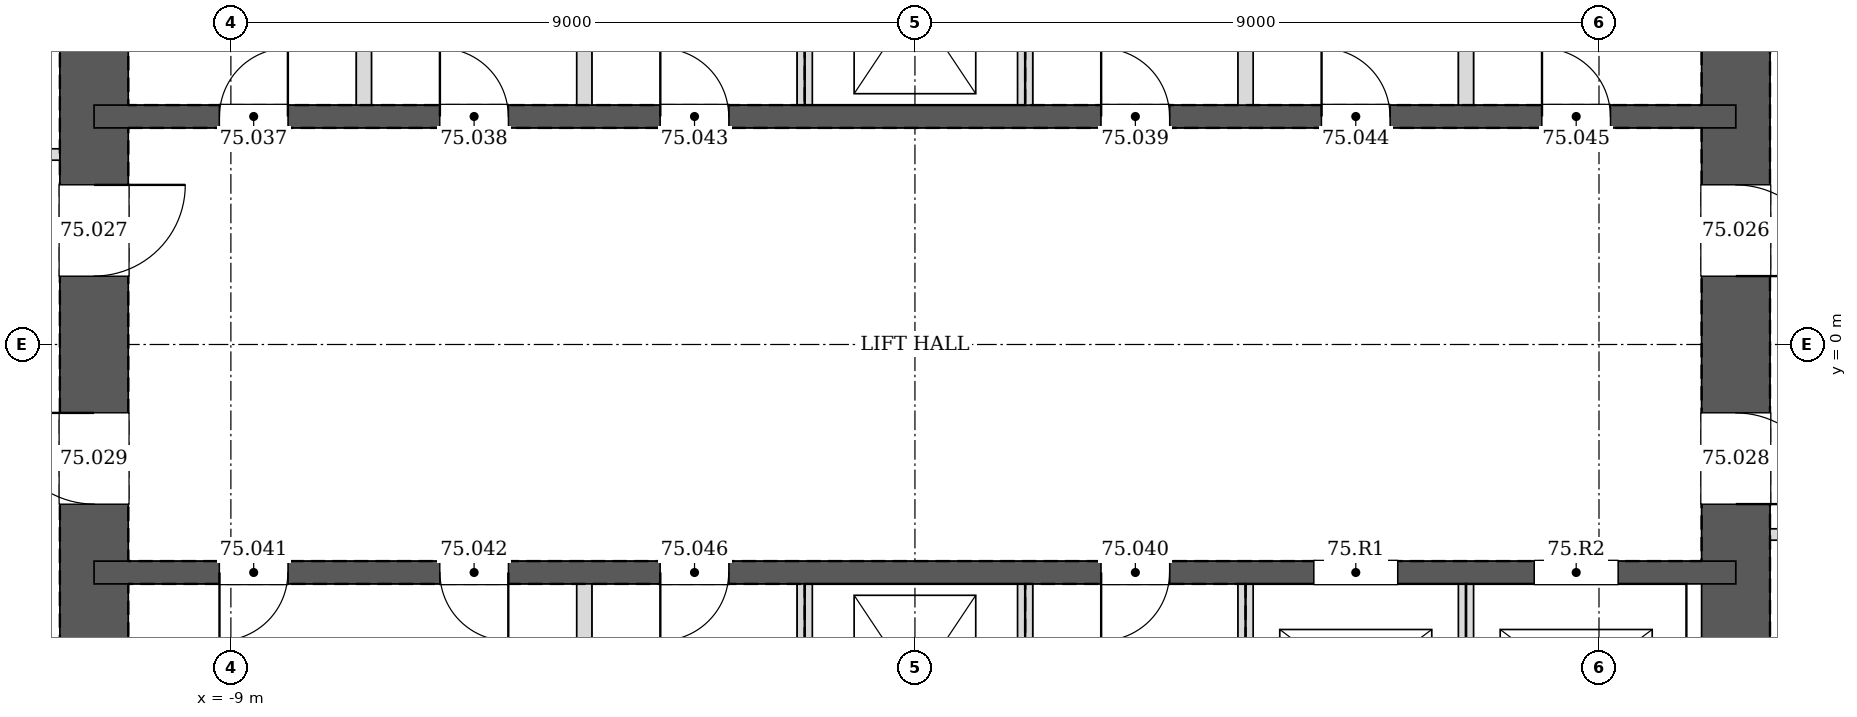
"""IFC4 building model, lengths in metres.
Left out: names, types, materials, properties, quantities, classifications, styles, units other than length and angle.
Written with IfcOpenShell. Run it as: python <this file> out.ifc"""

import sys

from ifc_helpers import new_model, si_unit, direction, frame, frame_2d, origin, place, context, subcontext, project, spatial, rectangle, extrude, element, fill, save


model = new_model("IFC4")
c1 = context("Model", 3, precision=1e-05, world=origin(), true_north=direction((0.0, 1.0)))
c2 = subcontext(c1, "Body", "Model", "MODEL_VIEW")
j1 = project(units=[si_unit("LENGTHUNIT", "METRE"), si_unit("PLANEANGLEUNIT", "RADIAN")], contexts=[c1])
p1 = place(None, origin())
s1 = spatial("IfcSite", under=j1, at=p1, CompositionType="ELEMENT")
p2 = place(p1, origin())
s2 = spatial("IfcBuilding", under=s1, at=p2, CompositionType="ELEMENT")
p3 = place(p2, frame((0.0, 0.0, 304.8)))
s3 = spatial("IfcBuildingStorey", under=s2, at=p3, CompositionType="ELEMENT", Elevation=304.8)
p4 = place(p3, frame((10.8, -10.8, 0.0), z_axis=(0.0, 0.0, 1.0), x_axis=(0.0, 1.0, 0.0)))
e1 = element("IfcWall", 1, at=p4, inside=s3, PredefinedType="SOLIDWALL", context=c2, shape_type="SweptSolid", body=[
    extrude(rectangle(XDim=21.6, YDim=0.9, at=frame_2d((10.8, 0.0))), origin(), (0.0, 0.0, 1.0), 3.4),
])
p5 = place(p4, frame((11.7, 0.0, 0.0)))
e2 = element("IfcOpeningElement", 2, at=p5, cuts=e1, PredefinedType="OPENING", context=c2, shape_type="SweptSolid", body=[
    extrude(rectangle(XDim=1.2, YDim=2.1, at=frame_2d((0.6, 1.05))), frame((0.0, 0.46, 0.0), z_axis=(0.0, -1.0, 0.0), x_axis=(1.0, 0.0, 0.0)), (0.0, 0.0, 1.0), 0.92),
])
p6 = place(p4, frame((8.7, 0.0, 0.0)))
e3 = element("IfcOpeningElement", 3, at=p6, cuts=e1, PredefinedType="OPENING", context=c2, shape_type="SweptSolid", body=[
    extrude(rectangle(XDim=1.2, YDim=2.1, at=frame_2d((0.6, 1.05))), frame((0.0, 0.46, 0.0), z_axis=(0.0, -1.0, 0.0), x_axis=(1.0, 0.0, 0.0)), (0.0, 0.0, 1.0), 0.92),
])
p7 = place(p3, frame((-10.8, 10.8, 0.0), z_axis=(0.0, 0.0, 1.0), x_axis=(0.0, -1.0, 0.0)))
e4 = element("IfcWall", 4, at=p7, inside=s3, PredefinedType="SOLIDWALL", context=c2, shape_type="SweptSolid", body=[
    extrude(rectangle(XDim=21.6, YDim=0.9, at=frame_2d((10.8, 0.0))), origin(), (0.0, 0.0, 1.0), 3.4),
])
p8 = place(p7, frame((8.7, 0.0, 0.0)))
e5 = element("IfcOpeningElement", 5, at=p8, cuts=e4, PredefinedType="OPENING", context=c2, shape_type="SweptSolid", body=[
    extrude(rectangle(XDim=1.2, YDim=2.1, at=frame_2d((0.6, 1.05))), frame((0.0, 0.46, 0.0), z_axis=(0.0, -1.0, 0.0), x_axis=(1.0, 0.0, 0.0)), (0.0, 0.0, 1.0), 0.92),
])
p9 = place(p7, frame((11.7, 0.0, 0.0)))
e6 = element("IfcOpeningElement", 6, at=p9, cuts=e4, PredefinedType="OPENING", context=c2, shape_type="SweptSolid", body=[
    extrude(rectangle(XDim=1.2, YDim=2.1, at=frame_2d((0.6, 1.05))), frame((0.0, 0.46, 0.0), z_axis=(0.0, -1.0, 0.0), x_axis=(1.0, 0.0, 0.0)), (0.0, 0.0, 1.0), 0.92),
])
p10 = place(p3, frame((-10.8, 3.0, 0.0), z_axis=(0.0, 0.0, 1.0), x_axis=(1.0, 0.0, 0.0)))
e7 = element("IfcWall", 7, at=p10, inside=s3, PredefinedType="SOLIDWALL", context=c2, shape_type="SweptSolid", body=[
    extrude(rectangle(XDim=21.6, YDim=0.3, at=frame_2d((10.8, 0.0))), origin(), (0.0, 0.0, 1.0), 3.4),
])
p11 = place(p10, frame((1.65, 0.0, 0.0)))
e8 = element("IfcOpeningElement", 8, at=p11, cuts=e7, PredefinedType="OPENING", context=c2, shape_type="SweptSolid", body=[
    extrude(rectangle(XDim=0.9, YDim=2.1, at=frame_2d((0.45, 1.05))), frame((0.0, 0.16, 0.0), z_axis=(0.0, -1.0, 0.0), x_axis=(1.0, 0.0, 0.0)), (0.0, 0.0, 1.0), 0.32),
])
p12 = place(p10, frame((4.55, 0.0, 0.0)))
e9 = element("IfcOpeningElement", 9, at=p12, cuts=e7, PredefinedType="OPENING", context=c2, shape_type="SweptSolid", body=[
    extrude(rectangle(XDim=0.9, YDim=2.1, at=frame_2d((0.45, 1.05))), frame((0.0, 0.16, 0.0), z_axis=(0.0, -1.0, 0.0), x_axis=(1.0, 0.0, 0.0)), (0.0, 0.0, 1.0), 0.32),
])
p13 = place(p10, frame((13.25, 0.0, 0.0)))
e10 = element("IfcOpeningElement", 10, at=p13, cuts=e7, PredefinedType="OPENING", context=c2, shape_type="SweptSolid", body=[
    extrude(rectangle(XDim=0.9, YDim=2.1, at=frame_2d((0.45, 1.05))), frame((0.0, 0.16, 0.0), z_axis=(0.0, -1.0, 0.0), x_axis=(1.0, 0.0, 0.0)), (0.0, 0.0, 1.0), 0.32),
])
p14 = place(p10, frame((7.45, 0.0, 0.0)))
e11 = element("IfcOpeningElement", 11, at=p14, cuts=e7, PredefinedType="OPENING", context=c2, shape_type="SweptSolid", body=[
    extrude(rectangle(XDim=0.9, YDim=2.1, at=frame_2d((0.45, 1.05))), frame((0.0, 0.16, 0.0), z_axis=(0.0, -1.0, 0.0), x_axis=(1.0, 0.0, 0.0)), (0.0, 0.0, 1.0), 0.32),
])
p15 = place(p10, frame((16.15, 0.0, 0.0)))
e12 = element("IfcOpeningElement", 12, at=p15, cuts=e7, PredefinedType="OPENING", context=c2, shape_type="SweptSolid", body=[
    extrude(rectangle(XDim=0.9, YDim=2.1, at=frame_2d((0.45, 1.05))), frame((0.0, 0.16, 0.0), z_axis=(0.0, -1.0, 0.0), x_axis=(1.0, 0.0, 0.0)), (0.0, 0.0, 1.0), 0.32),
])
p16 = place(p10, frame((19.05, 0.0, 0.0)))
e13 = element("IfcOpeningElement", 13, at=p16, cuts=e7, PredefinedType="OPENING", context=c2, shape_type="SweptSolid", body=[
    extrude(rectangle(XDim=0.9, YDim=2.1, at=frame_2d((0.45, 1.05))), frame((0.0, 0.16, 0.0), z_axis=(0.0, -1.0, 0.0), x_axis=(1.0, 0.0, 0.0)), (0.0, 0.0, 1.0), 0.32),
])
p17 = place(p3, frame((-10.8, -3.0, 0.0), z_axis=(0.0, 0.0, 1.0), x_axis=(1.0, 0.0, 0.0)))
e14 = element("IfcWall", 14, at=p17, inside=s3, PredefinedType="SOLIDWALL", context=c2, shape_type="SweptSolid", body=[
    extrude(rectangle(XDim=21.6, YDim=0.3, at=frame_2d((10.8, 0.0))), origin(), (0.0, 0.0, 1.0), 3.4),
])
p18 = place(p17, frame((13.25, 0.0, 0.0)))
e15 = element("IfcOpeningElement", 15, at=p18, cuts=e14, PredefinedType="OPENING", context=c2, shape_type="SweptSolid", body=[
    extrude(rectangle(XDim=0.9, YDim=2.1, at=frame_2d((0.45, 1.05))), frame((0.0, 0.16, 0.0), z_axis=(0.0, -1.0, 0.0), x_axis=(1.0, 0.0, 0.0)), (0.0, 0.0, 1.0), 0.32),
])
p19 = place(p17, frame((1.65, 0.0, 0.0)))
e16 = element("IfcOpeningElement", 16, at=p19, cuts=e14, PredefinedType="OPENING", context=c2, shape_type="SweptSolid", body=[
    extrude(rectangle(XDim=0.9, YDim=2.1, at=frame_2d((0.45, 1.05))), frame((0.0, 0.16, 0.0), z_axis=(0.0, -1.0, 0.0), x_axis=(1.0, 0.0, 0.0)), (0.0, 0.0, 1.0), 0.32),
])
p20 = place(p17, frame((4.55, 0.0, 0.0)))
e17 = element("IfcOpeningElement", 17, at=p20, cuts=e14, PredefinedType="OPENING", context=c2, shape_type="SweptSolid", body=[
    extrude(rectangle(XDim=0.9, YDim=2.1, at=frame_2d((0.45, 1.05))), frame((0.0, 0.16, 0.0), z_axis=(0.0, -1.0, 0.0), x_axis=(1.0, 0.0, 0.0)), (0.0, 0.0, 1.0), 0.32),
])
p21 = place(p17, frame((7.45, 0.0, 0.0)))
e18 = element("IfcOpeningElement", 18, at=p21, cuts=e14, PredefinedType="OPENING", context=c2, shape_type="SweptSolid", body=[
    extrude(rectangle(XDim=0.9, YDim=2.1, at=frame_2d((0.45, 1.05))), frame((0.0, 0.16, 0.0), z_axis=(0.0, -1.0, 0.0), x_axis=(1.0, 0.0, 0.0)), (0.0, 0.0, 1.0), 0.32),
])
p22 = place(p17, frame((16.05, 0.0, 0.0)))
e19 = element("IfcOpeningElement", 19, at=p22, cuts=e14, PredefinedType="OPENING", context=c2, shape_type="SweptSolid", body=[
    extrude(rectangle(XDim=1.1, YDim=2.1, at=frame_2d((0.55, 1.05))), frame((0.0, 0.16, 0.0), z_axis=(0.0, -1.0, 0.0), x_axis=(1.0, 0.0, 0.0)), (0.0, 0.0, 1.0), 0.32),
])
p23 = place(p17, frame((18.95, 0.0, 0.0)))
e20 = element("IfcOpeningElement", 20, at=p23, cuts=e14, PredefinedType="OPENING", context=c2, shape_type="SweptSolid", body=[
    extrude(rectangle(XDim=1.1, YDim=2.1, at=frame_2d((0.55, 1.05))), frame((0.0, 0.16, 0.0), z_axis=(0.0, -1.0, 0.0), x_axis=(1.0, 0.0, 0.0)), (0.0, 0.0, 1.0), 0.32),
])
p24 = place(p3, frame((11.25, -2.5, 0.0), z_axis=(0.0, 0.0, 1.0), x_axis=(1.0, 0.0, 0.0)))
e21 = element("IfcWall", 21, at=p24, inside=s3, PredefinedType="PARTITIONING", context=c2, shape_type="SweptSolid", body=[
    extrude(rectangle(XDim=1.65, YDim=0.15, at=frame_2d((0.825, 0.0))), origin(), (0.0, 0.0, 1.0), 3.2),
])
p25 = place(p3, frame((-11.25, 2.5, 0.0), z_axis=(0.0, 0.0, 1.0), x_axis=(-1.0, 0.0, 0.0)))
e22 = element("IfcWall", 22, at=p25, inside=s3, PredefinedType="PARTITIONING", context=c2, shape_type="SweptSolid", body=[
    extrude(rectangle(XDim=1.65, YDim=0.15, at=frame_2d((0.825, 0.0))), origin(), (0.0, 0.0, 1.0), 3.2),
])
p26 = place(p25, frame((0.35, 0.0, 0.0)))
e23 = element("IfcOpeningElement", 23, at=p26, cuts=e22, PredefinedType="OPENING", context=c2, shape_type="SweptSolid", body=[
    extrude(rectangle(XDim=0.95, YDim=2.1, at=frame_2d((0.475, 1.05))), frame((0.0, 0.085, 0.0), z_axis=(0.0, -1.0, 0.0), x_axis=(1.0, 0.0, 0.0)), (0.0, 0.0, 1.0), 0.17),
])
for number, where, z_axis, x_axis in (
    (24, (-7.25, 3.15, 0.0), (0.0, 0.0, 1.0), (0.0, 1.0, 0.0)),
    (25, (-4.35, 3.15, 0.0), (0.0, 0.0, 1.0), (0.0, 1.0, 0.0)),
    (26, (-1.45, 3.15, 0.0), (0.0, 0.0, 1.0), (0.0, 1.0, 0.0)),
    (27, (1.45, 3.15, 0.0), (0.0, 0.0, 1.0), (0.0, 1.0, 0.0)),
    (28, (4.35, 3.15, 0.0), (0.0, 0.0, 1.0), (0.0, 1.0, 0.0)),
    (29, (7.25, 3.15, 0.0), (0.0, 0.0, 1.0), (0.0, 1.0, 0.0)),
    (30, (-4.35, -5.85, 0.0), (0.0, 0.0, 1.0), (0.0, 1.0, 0.0)),
    (31, (-1.45, -5.85, 0.0), (0.0, 0.0, 1.0), (0.0, 1.0, 0.0)),
    (32, (1.45, -5.85, 0.0), (0.0, 0.0, 1.0), (0.0, 1.0, 0.0)),
    (33, (4.35, -5.85, 0.0), (0.0, 0.0, 1.0), (0.0, 1.0, 0.0)),
):
    element("IfcWall", number, at=place(p3, frame(where, z_axis=z_axis, x_axis=x_axis)), inside=s3, PredefinedType="PARTITIONING", context=c2, shape_type="SweptSolid", body=[
        extrude(rectangle(XDim=2.7, YDim=0.2, at=frame_2d((1.35, 0.0))), origin(), (0.0, 0.0, 1.0), 3.2),
    ])
p27 = place(p3, frame((7.25, -5.85, 0.0), z_axis=(0.0, 0.0, 1.0), x_axis=(0.0, 1.0, 0.0)))
e34 = element("IfcWall", 34, at=p27, inside=s3, PredefinedType="PARTITIONING", context=c2, shape_type="SweptSolid", body=[
    extrude(rectangle(XDim=2.7, YDim=0.2, at=frame_2d((1.35, 0.0))), origin(), (0.0, 0.0, 1.0), 3.4),
])
p28 = place(p5, frame((1.2, 0.0, 0.0), z_axis=(0.0, 0.0, 1.0), x_axis=(-1.0, 0.0, 0.0)))
e35 = element("IfcDoor", 35, at=p28, inside=s3, OperationType="SINGLE_SWING_RIGHT", PredefinedType="DOOR", context=c2, shape_type="SweptSolid", body=[
    extrude(rectangle(XDim=1.2, YDim=2.1, at=frame_2d((0.6, 1.05))), frame((0.0, 0.025, 0.0), z_axis=(0.0, -1.0, 0.0), x_axis=(1.0, 0.0, 0.0)), (0.0, 0.0, 1.0), 0.05),
])
fill(e2, e35)
p29 = place(p8, origin())
e36 = element("IfcDoor", 36, at=p29, inside=s3, OperationType="SINGLE_SWING_LEFT", PredefinedType="DOOR", context=c2, shape_type="SweptSolid", body=[
    extrude(rectangle(XDim=1.2, YDim=2.1, at=frame_2d((0.6, 1.05))), frame((0.0, 0.025, 0.0), z_axis=(0.0, -1.0, 0.0), x_axis=(1.0, 0.0, 0.0)), (0.0, 0.0, 1.0), 0.05),
])
fill(e5, e36)
p30 = place(p6, frame((1.2, 0.0, 0.0), z_axis=(0.0, 0.0, 1.0), x_axis=(-1.0, 0.0, 0.0)))
e37 = element("IfcDoor", 37, at=p30, inside=s3, OperationType="SINGLE_SWING_RIGHT", PredefinedType="DOOR", context=c2, shape_type="SweptSolid", body=[
    extrude(rectangle(XDim=1.2, YDim=2.1, at=frame_2d((0.6, 1.05))), frame((0.0, 0.025, 0.0), z_axis=(0.0, -1.0, 0.0), x_axis=(1.0, 0.0, 0.0)), (0.0, 0.0, 1.0), 0.05),
])
fill(e3, e37)
p31 = place(p9, frame((1.2, 0.0, 0.0), z_axis=(0.0, 0.0, 1.0), x_axis=(-1.0, 0.0, 0.0)))
e38 = element("IfcDoor", 38, at=p31, inside=s3, OperationType="SINGLE_SWING_RIGHT", PredefinedType="DOOR", context=c2, shape_type="SweptSolid", body=[
    extrude(rectangle(XDim=1.2, YDim=2.1, at=frame_2d((0.6, 1.05))), frame((0.0, 0.025, 0.0), z_axis=(0.0, -1.0, 0.0), x_axis=(1.0, 0.0, 0.0)), (0.0, 0.0, 1.0), 0.05),
])
fill(e6, e38)
p32 = place(p11, origin())
e39 = element("IfcDoor", 39, at=p32, inside=s3, OperationType="SINGLE_SWING_RIGHT", PredefinedType="DOOR", context=c2, shape_type="SweptSolid", body=[
    extrude(rectangle(XDim=0.9, YDim=2.1, at=frame_2d((0.45, 1.05))), frame((0.0, 0.025, 0.0), z_axis=(0.0, -1.0, 0.0), x_axis=(1.0, 0.0, 0.0)), (0.0, 0.0, 1.0), 0.05),
])
fill(e8, e39)
p33 = place(p12, origin())
e40 = element("IfcDoor", 40, at=p33, inside=s3, OperationType="SINGLE_SWING_LEFT", PredefinedType="DOOR", context=c2, shape_type="SweptSolid", body=[
    extrude(rectangle(XDim=0.9, YDim=2.1, at=frame_2d((0.45, 1.05))), frame((0.0, 0.025, 0.0), z_axis=(0.0, -1.0, 0.0), x_axis=(1.0, 0.0, 0.0)), (0.0, 0.0, 1.0), 0.05),
])
fill(e9, e40)
p34 = place(p13, origin())
e41 = element("IfcDoor", 41, at=p34, inside=s3, OperationType="SINGLE_SWING_LEFT", PredefinedType="DOOR", context=c2, shape_type="SweptSolid", body=[
    extrude(rectangle(XDim=0.9, YDim=2.1, at=frame_2d((0.45, 1.05))), frame((0.0, 0.025, 0.0), z_axis=(0.0, -1.0, 0.0), x_axis=(1.0, 0.0, 0.0)), (0.0, 0.0, 1.0), 0.05),
])
fill(e10, e41)
p35 = place(p18, frame((0.9, 0.0, 0.0), z_axis=(0.0, 0.0, 1.0), x_axis=(-1.0, 0.0, 0.0)))
e42 = element("IfcDoor", 42, at=p35, inside=s3, OperationType="SINGLE_SWING_RIGHT", PredefinedType="DOOR", context=c2, shape_type="SweptSolid", body=[
    extrude(rectangle(XDim=0.9, YDim=2.1, at=frame_2d((0.45, 1.05))), frame((0.0, 0.025, 0.0), z_axis=(0.0, -1.0, 0.0), x_axis=(1.0, 0.0, 0.0)), (0.0, 0.0, 1.0), 0.05),
])
fill(e15, e42)
p36 = place(p19, frame((0.9, 0.0, 0.0), z_axis=(0.0, 0.0, 1.0), x_axis=(-1.0, 0.0, 0.0)))
e43 = element("IfcDoor", 43, at=p36, inside=s3, OperationType="SINGLE_SWING_RIGHT", PredefinedType="DOOR", context=c2, shape_type="SweptSolid", body=[
    extrude(rectangle(XDim=0.9, YDim=2.1, at=frame_2d((0.45, 1.05))), frame((0.0, 0.025, 0.0), z_axis=(0.0, -1.0, 0.0), x_axis=(1.0, 0.0, 0.0)), (0.0, 0.0, 1.0), 0.05),
])
fill(e16, e43)
p37 = place(p20, frame((0.9, 0.0, 0.0), z_axis=(0.0, 0.0, 1.0), x_axis=(-1.0, 0.0, 0.0)))
e44 = element("IfcDoor", 44, at=p37, inside=s3, OperationType="SINGLE_SWING_LEFT", PredefinedType="DOOR", context=c2, shape_type="SweptSolid", body=[
    extrude(rectangle(XDim=0.9, YDim=2.1, at=frame_2d((0.45, 1.05))), frame((0.0, 0.025, 0.0), z_axis=(0.0, -1.0, 0.0), x_axis=(1.0, 0.0, 0.0)), (0.0, 0.0, 1.0), 0.05),
])
fill(e17, e44)
p38 = place(p14, origin())
e45 = element("IfcDoor", 45, at=p38, inside=s3, OperationType="SINGLE_SWING_LEFT", PredefinedType="DOOR", context=c2, shape_type="SweptSolid", body=[
    extrude(rectangle(XDim=0.9, YDim=2.1, at=frame_2d((0.45, 1.05))), frame((0.0, 0.025, 0.0), z_axis=(0.0, -1.0, 0.0), x_axis=(1.0, 0.0, 0.0)), (0.0, 0.0, 1.0), 0.05),
])
fill(e11, e45)
p39 = place(p15, origin())
e46 = element("IfcDoor", 46, at=p39, inside=s3, OperationType="SINGLE_SWING_LEFT", PredefinedType="DOOR", context=c2, shape_type="SweptSolid", body=[
    extrude(rectangle(XDim=0.9, YDim=2.1, at=frame_2d((0.45, 1.05))), frame((0.0, 0.025, 0.0), z_axis=(0.0, -1.0, 0.0), x_axis=(1.0, 0.0, 0.0)), (0.0, 0.0, 1.0), 0.05),
])
fill(e12, e46)
p40 = place(p16, origin())
e47 = element("IfcDoor", 47, at=p40, inside=s3, OperationType="SINGLE_SWING_LEFT", PredefinedType="DOOR", context=c2, shape_type="SweptSolid", body=[
    extrude(rectangle(XDim=0.9, YDim=2.1, at=frame_2d((0.45, 1.05))), frame((0.0, 0.025, 0.0), z_axis=(0.0, -1.0, 0.0), x_axis=(1.0, 0.0, 0.0)), (0.0, 0.0, 1.0), 0.05),
])
fill(e13, e47)
p41 = place(p21, frame((0.9, 0.0, 0.0), z_axis=(0.0, 0.0, 1.0), x_axis=(-1.0, 0.0, 0.0)))
e48 = element("IfcDoor", 48, at=p41, inside=s3, OperationType="SINGLE_SWING_RIGHT", PredefinedType="DOOR", context=c2, shape_type="SweptSolid", body=[
    extrude(rectangle(XDim=0.9, YDim=2.1, at=frame_2d((0.45, 1.05))), frame((0.0, 0.025, 0.0), z_axis=(0.0, -1.0, 0.0), x_axis=(1.0, 0.0, 0.0)), (0.0, 0.0, 1.0), 0.05),
])
fill(e18, e48)
p42 = place(p22, origin())
e49 = element("IfcDoor", 49, at=p42, inside=s3, OperationType="DOUBLE_DOOR_SLIDING", PredefinedType="DOOR", context=c2, shape_type="SweptSolid", body=[
    extrude(rectangle(XDim=1.1, YDim=2.1, at=frame_2d((0.55, 1.05))), frame((0.0, 0.025, 0.0), z_axis=(0.0, -1.0, 0.0), x_axis=(1.0, 0.0, 0.0)), (0.0, 0.0, 1.0), 0.05),
])
fill(e19, e49)
p43 = place(p23, origin())
e50 = element("IfcDoor", 50, at=p43, inside=s3, OperationType="DOUBLE_DOOR_SLIDING", PredefinedType="DOOR", context=c2, shape_type="SweptSolid", body=[
    extrude(rectangle(XDim=1.1, YDim=2.1, at=frame_2d((0.55, 1.05))), frame((0.0, 0.025, 0.0), z_axis=(0.0, -1.0, 0.0), x_axis=(1.0, 0.0, 0.0)), (0.0, 0.0, 1.0), 0.05),
])
fill(e20, e50)
save(model, sys.argv[1])
